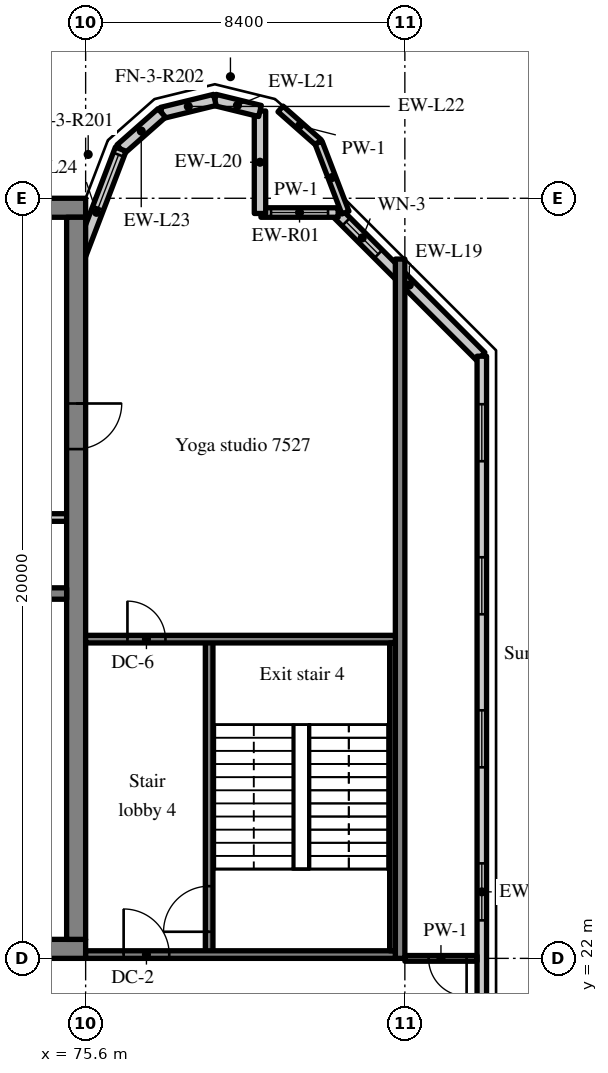
"""IFC4 building model, lengths in metres.
Left out: names, types, materials, properties, quantities, classifications, styles, units other than length and angle.
Written with IfcOpenShell. Run it as: python <this file> out.ifc"""

import sys

from ifc_helpers import new_model, si_unit, direction, frame, frame_2d, origin, place, context, subcontext, project, spatial, rectangle, extrude, source, transform, mapped, element, fill, save


model = new_model("IFC4")
c1 = context("Model", 3, precision=1e-05, world=origin(), true_north=direction((0.0, 1.0)))
c2 = subcontext(c1, "Body", "Model", "MODEL_VIEW")
j1 = project(units=[si_unit("LENGTHUNIT", "METRE"), si_unit("PLANEANGLEUNIT", "RADIAN")], contexts=[c1])
p1 = place(None, origin())
s1 = spatial("IfcSite", under=j1, at=p1, CompositionType="ELEMENT")
p2 = place(p1, origin())
s2 = spatial("IfcBuilding", under=s1, at=p2, CompositionType="ELEMENT")
p3 = place(p2, frame((0.0, 0.0, 313.7)))
s3 = spatial("IfcBuildingStorey", under=s2, at=p3, CompositionType="ELEMENT", Elevation=313.7)
m1 = source(origin(), c2, "Body", "SweptSolid", [
    extrude(rectangle(XDim=50.4, YDim=0.5, at=frame_2d((25.2, 0.0))), origin(), (0.0, 0.0, 1.0), 3.72),
])
p4 = place(p3, frame((25.2, 22.25, 0.0), z_axis=(0.0, 0.0, 1.0), x_axis=(1.0, 0.0, 0.0)))
e1 = element("IfcWall", 1, at=p4, inside=s3, PredefinedType="SHEAR", context=c2, shape_type="MappedRepresentation", body=[
    mapped(m1, transform((0.0, 0.0, 0.0), scale=1.0)),
])
m2 = source(origin(), c2, "Body", "SweptSolid", [
    extrude(rectangle(XDim=1.8, YDim=2.1, at=frame_2d((0.9, 1.05))), frame((0.0, 0.26, 0.0), z_axis=(0.0, -1.0, 0.0), x_axis=(1.0, 0.0, 0.0)), (0.0, 0.0, 1.0), 0.52),
])
p5 = place(p4, frame((15.9, 0.0, 0.0)))
e2 = element("IfcOpeningElement", 2, at=p5, cuts=e1, PredefinedType="OPENING", context=c2, shape_type="MappedRepresentation", body=[
    mapped(m2, transform((0.0, 0.0, 0.0), scale=1.0)),
])
m3 = source(origin(), c2, "Body", "SweptSolid", [
    extrude(rectangle(XDim=0.9, YDim=2.1, at=frame_2d((0.45, 1.05))), frame((0.0, 0.26, 0.0), z_axis=(0.0, -1.0, 0.0), x_axis=(1.0, 0.0, 0.0)), (0.0, 0.0, 1.0), 0.52),
])
p6 = place(p4, frame((9.675, 0.0, 0.0)))
e3 = element("IfcOpeningElement", 3, at=p6, cuts=e1, PredefinedType="OPENING", context=c2, shape_type="MappedRepresentation", body=[
    mapped(m3, transform((0.0, 0.0, 0.0), scale=1.0)),
])
p7 = place(p4, frame((21.525, 0.0, 0.0)))
e4 = element("IfcOpeningElement", 4, at=p7, cuts=e1, PredefinedType="OPENING", context=c2, shape_type="MappedRepresentation", body=[
    mapped(m3, transform((0.0, 0.0, 0.0), scale=1.0)),
])
p8 = place(p4, frame((32.7, 0.0, 0.0)))
e5 = element("IfcOpeningElement", 5, at=p8, cuts=e1, PredefinedType="OPENING", context=c2, shape_type="MappedRepresentation", body=[
    mapped(m2, transform((0.0, 0.0, 0.0), scale=1.0)),
])
m4 = source(origin(), c2, "Body", "SweptSolid", [
    extrude(rectangle(XDim=1.2, YDim=2.1, at=frame_2d((0.6, 1.05))), frame((0.0, 0.26, 0.0), z_axis=(0.0, -1.0, 0.0), x_axis=(1.0, 0.0, 0.0)), (0.0, 0.0, 1.0), 0.52),
])
p9 = place(p4, frame((6.5, 0.0, 0.0)))
e6 = element("IfcOpeningElement", 6, at=p9, cuts=e1, PredefinedType="OPENING", context=c2, shape_type="MappedRepresentation", body=[
    mapped(m4, transform((0.0, 0.0, 0.0), scale=1.0)),
])
p10 = place(p4, frame((47.975, 0.0, 0.0)))
e7 = element("IfcOpeningElement", 7, at=p10, cuts=e1, PredefinedType="OPENING", context=c2, shape_type="MappedRepresentation", body=[
    mapped(m4, transform((0.0, 0.0, 0.0), scale=1.0)),
])
p11 = place(p3, frame((25.2, 41.75, 0.0), z_axis=(0.0, 0.0, 1.0), x_axis=(1.0, 0.0, 0.0)))
e8 = element("IfcWall", 8, at=p11, inside=s3, PredefinedType="SHEAR", context=c2, shape_type="MappedRepresentation", body=[
    mapped(m1, transform((0.0, 0.0, 0.0), scale=1.0)),
])
m5 = source(origin(), c2, "Body", "SweptSolid", [
    extrude(rectangle(XDim=19.0, YDim=0.5, at=frame_2d((9.5, 0.0))), origin(), (0.0, 0.0, 1.0), 3.72),
])
p12 = place(p3, frame((75.35, 22.5, 0.0), z_axis=(0.0, 0.0, 1.0), x_axis=(0.0, 1.0, 0.0)))
e9 = element("IfcWall", 9, at=p12, inside=s3, PredefinedType="SHEAR", context=c2, shape_type="MappedRepresentation", body=[
    mapped(m5, transform((0.0, 0.0, 0.0), scale=1.0)),
])
p13 = place(p12, frame((12.9, 0.0, 0.0)))
e10 = element("IfcOpeningElement", 10, at=p13, cuts=e9, PredefinedType="OPENING", context=c2, shape_type="MappedRepresentation", body=[
    mapped(m4, transform((0.0, 0.0, 0.0), scale=1.0)),
])
m6 = source(origin(), c2, "Body", "SweptSolid", [
    extrude(rectangle(XDim=7.75, YDim=0.3, at=frame_2d((3.875, 0.0))), origin(), (0.0, 0.0, 1.0), 3.72),
])
p14 = place(p3, frame((67.35, 31.6, 0.0), z_axis=(0.0, 0.0, 1.0), x_axis=(1.0, 0.0, 0.0)))
e11 = element("IfcWall", 11, at=p14, inside=s3, PredefinedType="SHEAR", context=c2, shape_type="MappedRepresentation", body=[
    mapped(m6, transform((0.0, 0.0, 0.0), scale=1.0)),
])
m7 = source(origin(), c2, "Body", "SweptSolid", [
    extrude(rectangle(XDim=1.1, YDim=2.1, at=frame_2d((0.55, 1.05))), frame((0.0, 0.16, 0.0), z_axis=(0.0, -1.0, 0.0), x_axis=(1.0, 0.0, 0.0)), (0.0, 0.0, 1.0), 0.32),
])
p15 = place(p14, frame((5.875, 0.0, 0.0)))
e12 = element("IfcOpeningElement", 12, at=p15, cuts=e11, PredefinedType="OPENING", context=c2, shape_type="MappedRepresentation", body=[
    mapped(m7, transform((0.0, 0.0, 0.0), scale=1.0)),
])
m8 = source(origin(), c2, "Body", "SweptSolid", [
    extrude(rectangle(XDim=18.4, YDim=0.25, at=frame_2d((9.2, 0.0))), origin(), (0.0, 0.0, 1.0), 3.72),
])
p16 = place(p3, frame((83.875, 22.0, 0.0), z_axis=(0.0, 0.0, 1.0), x_axis=(0.0, 1.0, 0.0)))
e13 = element("IfcWall", 13, at=p16, inside=s3, PredefinedType="SHEAR", context=c2, shape_type="MappedRepresentation", body=[
    mapped(m8, transform((0.0, 0.0, 0.0), scale=1.0)),
])
m9 = source(origin(), c2, "Body", "SweptSolid", [
    extrude(rectangle(XDim=5.326, YDim=0.3, at=frame_2d((2.663, 0.0))), origin(), (0.0, 0.0, 1.0), 3.72),
])
p17 = place(p3, frame((86.0, 37.834, 0.0), z_axis=(0.0, 0.0, 1.0), x_axis=(-0.707083859269, 0.707129702361, 0.0)))
e14 = element("IfcWall", 14, at=p17, inside=s3, PredefinedType="SOLIDWALL", context=c2, shape_type="MappedRepresentation", body=[
    mapped(m9, transform((0.0, 0.0, 0.0), scale=1.0)),
])
m10 = source(origin(), c2, "Body", "SweptSolid", [
    extrude(rectangle(XDim=1.2, YDim=1.5, at=frame_2d((0.6, 0.75))), frame((0.0, 0.16, 0.0), z_axis=(0.0, -1.0, 0.0), x_axis=(1.0, 0.0, 0.0)), (0.0, 0.0, 1.0), 0.32),
])
p18 = place(p17, frame((3.815, 0.0, 0.9)))
e15 = element("IfcOpeningElement", 15, at=p18, cuts=e14, PredefinedType="OPENING", context=c2, shape_type="MappedRepresentation", body=[
    mapped(m10, transform((0.0, 0.0, 0.0), scale=1.0)),
])
m11 = source(origin(), c2, "Body", "SweptSolid", [
    extrude(rectangle(XDim=2.032, YDim=0.25, at=frame_2d((1.016, 0.0))), origin(), (0.0, 0.0, 1.0), 3.17),
])
p19 = place(p3, frame((82.245, 41.625, 0.0), z_axis=(0.0, 0.0, 1.0), x_axis=(-1.0, 0.0, 0.0)))
e16 = element("IfcWall", 16, at=p19, inside=s3, PredefinedType="SOLIDWALL", context=c2, shape_type="MappedRepresentation", body=[
    mapped(m11, transform((0.0, 0.0, 0.0), scale=1.0)),
])
m12 = source(origin(), c2, "Body", "SweptSolid", [
    extrude(rectangle(XDim=1.5, YDim=1.5, at=frame_2d((0.75, 0.75))), frame((0.0, 0.135, 0.0), z_axis=(0.0, -1.0, 0.0), x_axis=(1.0, 0.0, 0.0)), (0.0, 0.0, 1.0), 0.27),
])
p20 = place(p19, frame((0.266, 0.0, 0.9)))
e17 = element("IfcOpeningElement", 17, at=p20, cuts=e16, PredefinedType="OPENING", context=c2, shape_type="MappedRepresentation", body=[
    mapped(m12, transform((0.0, 0.0, 0.0), scale=1.0)),
])
m13 = source(origin(), c2, "Body", "SweptSolid", [
    extrude(rectangle(XDim=2.696, YDim=0.3, at=frame_2d((1.348, 0.0))), origin(), (0.0, 0.0, 1.0), 3.72),
])
p21 = place(p3, frame((80.188, 41.6, 0.0), z_axis=(0.0, 0.0, 1.0), x_axis=(0.0, 1.0, 0.0)))
e18 = element("IfcWall", 18, at=p21, inside=s3, PredefinedType="SOLIDWALL", context=c2, shape_type="MappedRepresentation", body=[
    mapped(m13, transform((0.0, 0.0, 0.0), scale=1.0)),
])
m14 = source(origin(), c2, "Body", "SweptSolid", [
    extrude(rectangle(XDim=1.223, YDim=0.3, at=frame_2d((0.612, 0.0))), origin(), (0.0, 0.0, 1.0), 3.72),
])
p22 = place(p3, frame((80.188, 44.296, 0.0), z_axis=(0.0, 0.0, 1.0), x_axis=(-0.971143721305, 0.238495015816, 0.0)))
e19 = element("IfcWall", 19, at=p22, inside=s3, PredefinedType="SOLIDWALL", context=c2, shape_type="MappedRepresentation", body=[
    mapped(m14, transform((0.0, 0.0, 0.0), scale=1.0)),
])
m15 = source(origin(), c2, "Body", "SweptSolid", [
    extrude(rectangle(XDim=1.439, YDim=0.3, at=frame_2d((0.719, 0.0))), origin(), (0.0, 0.0, 1.0), 3.72),
])
p23 = place(p3, frame((79.0, 44.588, 0.0), z_axis=(0.0, 0.0, 1.0), x_axis=(-0.971161932466, -0.238420848351, 0.0)))
e20 = element("IfcWall", 20, at=p23, inside=s3, PredefinedType="SOLIDWALL", context=c2, shape_type="MappedRepresentation", body=[
    mapped(m15, transform((0.0, 0.0, 0.0), scale=1.0)),
])
m16 = source(origin(), c2, "Body", "SweptSolid", [
    extrude(rectangle(XDim=1.44, YDim=0.3, at=frame_2d((0.72, 0.0))), origin(), (0.0, 0.0, 1.0), 3.72),
])
p24 = place(p3, frame((77.603, 44.245, 0.0), z_axis=(0.0, 0.0, 1.0), x_axis=(-0.74957555648, -0.661918790432, 0.0)))
e21 = element("IfcWall", 21, at=p24, inside=s3, PredefinedType="SOLIDWALL", context=c2, shape_type="MappedRepresentation", body=[
    mapped(m16, transform((0.0, 0.0, 0.0), scale=1.0)),
])
m17 = source(origin(), c2, "Body", "SweptSolid", [
    extrude(rectangle(XDim=3.559, YDim=0.3, at=frame_2d((1.78, 0.0))), origin(), (0.0, 0.0, 1.0), 3.72),
])
p25 = place(p3, frame((76.523, 43.292, 0.0), z_axis=(0.0, 0.0, 1.0), x_axis=(-0.35779745313, -0.933799219604, 0.0)))
e22 = element("IfcWall", 22, at=p25, inside=s3, PredefinedType="SOLIDWALL", context=c2, shape_type="MappedRepresentation", body=[
    mapped(m17, transform((0.0, 0.0, 0.0), scale=1.0)),
])
m18 = source(origin(), c2, "Body", "SweptSolid", [
    extrude(rectangle(XDim=1.5, YDim=2.0, at=frame_2d((0.75, 1.0))), frame((0.0, 0.16, 0.0), z_axis=(0.0, -1.0, 0.0), x_axis=(1.0, 0.0, 0.0)), (0.0, 0.0, 1.0), 0.32),
])
p26 = place(p25, frame((0.156, 0.0, 0.9)))
e23 = element("IfcOpeningElement", 23, at=p26, cuts=e22, PredefinedType="OPENING", context=c2, shape_type="MappedRepresentation", body=[
    mapped(m18, transform((0.0, 0.0, 0.0), scale=1.0)),
])
m19 = source(origin(), c2, "Body", "SweptSolid", [
    extrude(rectangle(XDim=28.189, YDim=0.25, at=frame_2d((14.095, 0.0))), origin(), (0.0, 0.0, 1.0), 3.72),
])
p27 = place(p3, frame((86.025, 9.655, 0.0), z_axis=(0.0, 0.0, 1.0), x_axis=(0.0, 1.0, 0.0)))
e24 = element("IfcWall", 24, at=p27, inside=s3, PredefinedType="SOLIDWALL", context=c2, shape_type="MappedRepresentation", body=[
    mapped(m19, transform((0.0, 0.0, 0.0), scale=1.0)),
])
p28 = place(p27, frame((1.263, 0.0, 0.9)))
e25 = element("IfcOpeningElement", 25, at=p28, cuts=e24, PredefinedType="OPENING", context=c2, shape_type="MappedRepresentation", body=[
    mapped(m12, transform((0.0, 0.0, 0.0), scale=1.0)),
])
p29 = place(p27, frame((5.291, 0.0, 0.9)))
e26 = element("IfcOpeningElement", 26, at=p29, cuts=e24, PredefinedType="OPENING", context=c2, shape_type="MappedRepresentation", body=[
    mapped(m12, transform((0.0, 0.0, 0.0), scale=1.0)),
])
p30 = place(p27, frame((9.318, 0.0, 0.9)))
e27 = element("IfcOpeningElement", 27, at=p30, cuts=e24, PredefinedType="OPENING", context=c2, shape_type="MappedRepresentation", body=[
    mapped(m12, transform((0.0, 0.0, 0.0), scale=1.0)),
])
p31 = place(p27, frame((13.345, 0.0, 0.9)))
e28 = element("IfcOpeningElement", 28, at=p31, cuts=e24, PredefinedType="OPENING", context=c2, shape_type="MappedRepresentation", body=[
    mapped(m12, transform((0.0, 0.0, 0.0), scale=1.0)),
])
p32 = place(p27, frame((17.372, 0.0, 0.9)))
e29 = element("IfcOpeningElement", 29, at=p32, cuts=e24, PredefinedType="OPENING", context=c2, shape_type="MappedRepresentation", body=[
    mapped(m12, transform((0.0, 0.0, 0.0), scale=1.0)),
])
p33 = place(p27, frame((21.399, 0.0, 0.9)))
e30 = element("IfcOpeningElement", 30, at=p33, cuts=e24, PredefinedType="OPENING", context=c2, shape_type="MappedRepresentation", body=[
    mapped(m12, transform((0.0, 0.0, 0.0), scale=1.0)),
])
p34 = place(p27, frame((25.426, 0.0, 0.9)))
e31 = element("IfcOpeningElement", 31, at=p34, cuts=e24, PredefinedType="OPENING", context=c2, shape_type="MappedRepresentation", body=[
    mapped(m12, transform((0.0, 0.0, 0.0), scale=1.0)),
])
m20 = source(origin(), c2, "Body", "SweptSolid", [
    extrude(rectangle(XDim=1.335, YDim=0.2, at=frame_2d((0.667, 0.0))), origin(), (0.0, 0.0, 1.0), 1.1),
])
p35 = place(p3, frame((80.728, 44.351, -0.05), z_axis=(0.0, 0.0, 1.0), x_axis=(0.749645640847, -0.661839416444, 0.0)))
e32 = element("IfcWall", 32, at=p35, inside=s3, PredefinedType="PARAPET", context=c2, shape_type="MappedRepresentation", body=[
    mapped(m20, transform((0.0, 0.0, 0.0), scale=1.0)),
])
m21 = source(origin(), c2, "Body", "SweptSolid", [
    extrude(rectangle(XDim=1.975, YDim=0.2, at=frame_2d((0.988, 0.0))), origin(), (0.0, 0.0, 1.0), 1.1),
])
p36 = place(p3, frame((81.729, 43.467, -0.05), z_axis=(0.0, 0.0, 1.0), x_axis=(0.357819264753, -0.933790861902, 0.0)))
e33 = element("IfcWall", 33, at=p36, inside=s3, PredefinedType="PARAPET", context=c2, shape_type="MappedRepresentation", body=[
    mapped(m21, transform((0.0, 0.0, 0.0), scale=1.0)),
])
m22 = source(origin(), c2, "Body", "SweptSolid", [
    extrude(rectangle(XDim=2.65, YDim=0.2, at=frame_2d((1.325, 0.0))), origin(), (0.0, 0.0, 1.0), 3.72),
])
p37 = place(p3, frame((72.45, 33.6, 0.0), z_axis=(0.0, 0.0, 1.0), x_axis=(1.0, 0.0, 0.0)))
e34 = element("IfcWall", 34, at=p37, inside=s3, PredefinedType="SOLIDWALL", context=c2, shape_type="MappedRepresentation", body=[
    mapped(m22, transform((0.0, 0.0, 0.0), scale=1.0)),
])
m23 = source(origin(), c2, "Body", "SweptSolid", [
    extrude(rectangle(XDim=8.3, YDim=0.2, at=frame_2d((4.15, 0.0))), origin(), (0.0, 0.0, 1.0), 3.72),
])
p38 = place(p3, frame((78.85, 22.1, 0.0), z_axis=(0.0, 0.0, 1.0), x_axis=(0.0, 1.0, 0.0)))
e35 = element("IfcWall", 35, at=p38, inside=s3, PredefinedType="SOLIDWALL", context=c2, shape_type="MappedRepresentation", body=[
    mapped(m23, transform((0.0, 0.0, 0.0), scale=1.0)),
])
m24 = source(origin(), c2, "Body", "SweptSolid", [
    extrude(rectangle(XDim=1.2, YDim=2.1, at=frame_2d((0.6, 1.05))), frame((0.0, 0.11, 0.0), z_axis=(0.0, -1.0, 0.0), x_axis=(1.0, 0.0, 0.0)), (0.0, 0.0, 1.0), 0.22),
])
p39 = place(p38, frame((0.6, 0.0, 0.0)))
e36 = element("IfcOpeningElement", 36, at=p39, cuts=e35, PredefinedType="OPENING", context=c2, shape_type="MappedRepresentation", body=[
    mapped(m24, transform((0.0, 0.0, 0.0), scale=1.0)),
])
m25 = source(origin(), c2, "Body", "SweptSolid", [
    extrude(rectangle(XDim=8.15, YDim=0.2, at=frame_2d((4.075, 0.0))), origin(), (0.0, 0.0, 1.0), 3.72),
])
p40 = place(p3, frame((83.75, 22.1, 0.0), z_axis=(0.0, 0.0, 1.0), x_axis=(-1.0, 0.0, 0.0)))
e37 = element("IfcWall", 37, at=p40, inside=s3, PredefinedType="SOLIDWALL", context=c2, shape_type="MappedRepresentation", body=[
    mapped(m25, transform((0.0, 0.0, 0.0), scale=1.0)),
])
p41 = place(p40, frame((5.95, 0.0, 0.0)))
e38 = element("IfcOpeningElement", 38, at=p41, cuts=e37, PredefinedType="OPENING", context=c2, shape_type="MappedRepresentation", body=[
    mapped(m24, transform((0.0, 0.0, 0.0), scale=1.0)),
])
p42 = place(p3, frame((83.75, 30.4, 0.0), z_axis=(0.0, 0.0, 1.0), x_axis=(-1.0, 0.0, 0.0)))
e39 = element("IfcWall", 39, at=p42, inside=s3, PredefinedType="SOLIDWALL", context=c2, shape_type="MappedRepresentation", body=[
    mapped(m25, transform((0.0, 0.0, 0.0), scale=1.0)),
])
m26 = source(origin(), c2, "Body", "SweptSolid", [
    extrude(rectangle(XDim=1.0, YDim=2.1, at=frame_2d((0.5, 1.05))), frame((0.0, 0.11, 0.0), z_axis=(0.0, -1.0, 0.0), x_axis=(1.0, 0.0, 0.0)), (0.0, 0.0, 1.0), 0.22),
])
p43 = place(p42, frame((6.05, 0.0, 0.0)))
e40 = element("IfcOpeningElement", 40, at=p43, cuts=e39, PredefinedType="OPENING", context=c2, shape_type="MappedRepresentation", body=[
    mapped(m26, transform((0.0, 0.0, 0.0), scale=1.0)),
])
m27 = source(origin(), c2, "Body", "SweptSolid", [
    extrude(rectangle(XDim=8.1, YDim=0.15, at=frame_2d((4.05, 0.0))), origin(), (0.0, 0.0, 1.0), 3.72),
])
p44 = place(p3, frame((83.675, 22.2, 0.0), z_axis=(0.0, 0.0, 1.0), x_axis=(0.0, 1.0, 0.0)))
e41 = element("IfcWall", 41, at=p44, inside=s3, PredefinedType="SOLIDWALL", context=c2, shape_type="MappedRepresentation", body=[
    mapped(m27, transform((0.0, 0.0, 0.0), scale=1.0)),
])
m28 = source(origin(), c2, "Body", "SweptSolid", [
    extrude(rectangle(XDim=1.9, YDim=0.15, at=frame_2d((0.95, 0.0))), origin(), (0.0, 0.0, 1.0), 3.02),
])
p45 = place(p3, frame((84.0, 22.0, 0.0), z_axis=(0.0, 0.0, 1.0), x_axis=(1.0, 0.0, 0.0)))
e42 = element("IfcWall", 42, at=p45, inside=s3, PredefinedType="PARTITIONING", context=c2, shape_type="MappedRepresentation", body=[
    mapped(m28, transform((0.0, 0.0, 0.0), scale=1.0)),
])
m29 = source(origin(), c2, "Body", "SweptSolid", [
    extrude(rectangle(XDim=1.0, YDim=2.1, at=frame_2d((0.5, 1.05))), frame((0.0, 0.085, 0.0), z_axis=(0.0, -1.0, 0.0), x_axis=(1.0, 0.0, 0.0)), (0.0, 0.0, 1.0), 0.17),
])
p46 = place(p45, frame((0.625, 0.0, 0.0)))
e43 = element("IfcOpeningElement", 43, at=p46, cuts=e42, PredefinedType="OPENING", context=c2, shape_type="MappedRepresentation", body=[
    mapped(m29, transform((0.0, 0.0, 0.0), scale=1.0)),
])
m30 = source(origin(), c2, "Body", "SweptSolid", [
    extrude(rectangle(XDim=1.2, YDim=1.5, at=frame_2d((0.6, 0.75))), frame((0.0, 0.03, 0.0), z_axis=(0.0, -1.0, 0.0), x_axis=(1.0, 0.0, 0.0)), (0.0, 0.0, 1.0), 0.06),
])
p47 = place(p18, origin())
e44 = element("IfcWindow", 44, at=p47, inside=s3, PartitioningType="SINGLE_PANEL", PredefinedType="WINDOW", context=c2, shape_type="MappedRepresentation", body=[
    mapped(m30, transform((0.0, 0.0, 0.0), scale=1.0)),
])
fill(e15, e44)
m31 = source(origin(), c2, "Body", "SweptSolid", [
    extrude(rectangle(XDim=1.5, YDim=1.5, at=frame_2d((0.75, 0.75))), frame((0.0, 0.03, 0.0), z_axis=(0.0, -1.0, 0.0), x_axis=(1.0, 0.0, 0.0)), (0.0, 0.0, 1.0), 0.06),
])
p48 = place(p20, origin())
e45 = element("IfcWindow", 45, at=p48, inside=s3, PartitioningType="SINGLE_PANEL", PredefinedType="WINDOW", context=c2, shape_type="MappedRepresentation", body=[
    mapped(m31, transform((0.0, 0.0, 0.0), scale=1.0)),
])
fill(e17, e45)
m32 = source(origin(), c2, "Body", "SweptSolid", [
    extrude(rectangle(XDim=1.5, YDim=2.0, at=frame_2d((0.75, 1.0))), frame((0.0, 0.03, 0.0), z_axis=(0.0, -1.0, 0.0), x_axis=(1.0, 0.0, 0.0)), (0.0, 0.0, 1.0), 0.06),
])
p49 = place(p26, origin())
e46 = element("IfcWindow", 46, at=p49, inside=s3, PartitioningType="SINGLE_PANEL", PredefinedType="WINDOW", context=c2, shape_type="MappedRepresentation", body=[
    mapped(m32, transform((0.0, 0.0, 0.0), scale=1.0)),
])
fill(e23, e46)
p50 = place(p31, origin())
e47 = element("IfcWindow", 47, at=p50, inside=s3, PartitioningType="SINGLE_PANEL", PredefinedType="WINDOW", context=c2, shape_type="MappedRepresentation", body=[
    mapped(m31, transform((0.0, 0.0, 0.0), scale=1.0)),
])
fill(e28, e47)
p51 = place(p32, origin())
e48 = element("IfcWindow", 48, at=p51, inside=s3, PartitioningType="SINGLE_PANEL", PredefinedType="WINDOW", context=c2, shape_type="MappedRepresentation", body=[
    mapped(m31, transform((0.0, 0.0, 0.0), scale=1.0)),
])
fill(e29, e48)
p52 = place(p33, origin())
e49 = element("IfcWindow", 49, at=p52, inside=s3, PartitioningType="SINGLE_PANEL", PredefinedType="WINDOW", context=c2, shape_type="MappedRepresentation", body=[
    mapped(m31, transform((0.0, 0.0, 0.0), scale=1.0)),
])
fill(e30, e49)
p53 = place(p34, origin())
e50 = element("IfcWindow", 50, at=p53, inside=s3, PartitioningType="SINGLE_PANEL", PredefinedType="WINDOW", context=c2, shape_type="MappedRepresentation", body=[
    mapped(m31, transform((0.0, 0.0, 0.0), scale=1.0)),
])
fill(e31, e50)
m33 = source(origin(), c2, "Body", "SweptSolid", [
    extrude(rectangle(XDim=1.2, YDim=2.1, at=frame_2d((0.6, 1.05))), frame((0.0, 0.025, 0.0), z_axis=(0.0, -1.0, 0.0), x_axis=(1.0, 0.0, 0.0)), (0.0, 0.0, 1.0), 0.05),
])
p54 = place(p13, origin())
e51 = element("IfcDoor", 51, at=p54, inside=s3, OperationType="SINGLE_SWING_RIGHT", PredefinedType="DOOR", context=c2, shape_type="MappedRepresentation", body=[
    mapped(m33, transform((0.0, 0.0, 0.0), scale=1.0)),
])
fill(e10, e51)
p55 = place(p39, origin())
e52 = element("IfcDoor", 52, at=p55, inside=s3, OperationType="SINGLE_SWING_LEFT", PredefinedType="DOOR", context=c2, shape_type="MappedRepresentation", body=[
    mapped(m33, transform((0.0, 0.0, 0.0), scale=1.0)),
])
fill(e36, e52)
p56 = place(p41, origin())
e53 = element("IfcDoor", 53, at=p56, inside=s3, OperationType="SINGLE_SWING_RIGHT", PredefinedType="DOOR", context=c2, shape_type="MappedRepresentation", body=[
    mapped(m33, transform((0.0, 0.0, 0.0), scale=1.0)),
])
fill(e38, e53)
m34 = source(origin(), c2, "Body", "SweptSolid", [
    extrude(rectangle(XDim=1.0, YDim=2.1, at=frame_2d((0.5, 1.05))), frame((0.0, 0.025, 0.0), z_axis=(0.0, -1.0, 0.0), x_axis=(1.0, 0.0, 0.0)), (0.0, 0.0, 1.0), 0.05),
])
p57 = place(p43, origin())
e54 = element("IfcDoor", 54, at=p57, inside=s3, OperationType="SINGLE_SWING_RIGHT", PredefinedType="DOOR", context=c2, shape_type="MappedRepresentation", body=[
    mapped(m34, transform((0.0, 0.0, 0.0), scale=1.0)),
])
fill(e40, e54)
p58 = place(p46, origin())
e55 = element("IfcDoor", 55, at=p58, inside=s3, OperationType="SINGLE_SWING_RIGHT", PredefinedType="DOOR", context=c2, shape_type="MappedRepresentation", body=[
    mapped(m34, transform((0.0, 0.0, 0.0), scale=1.0)),
])
fill(e43, e55)
save(model, sys.argv[1])
